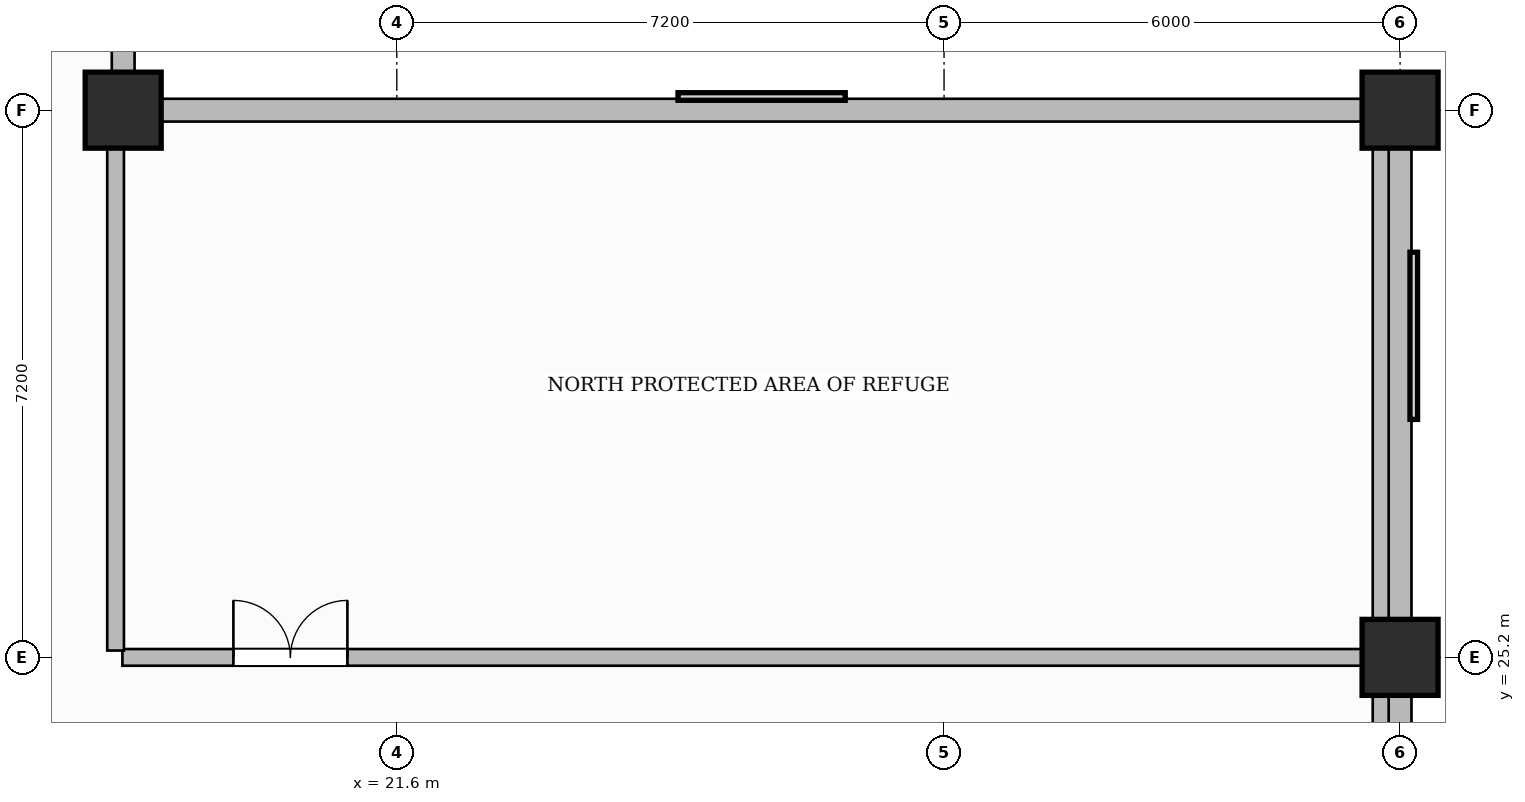
"""IFC4 building model, lengths in metres.
Left out: names, types, materials, properties, quantities, classifications, styles, units other than length and angle.
Written with IfcOpenShell. Run it as: python <this file> out.ifc"""

import sys

from ifc_helpers import new_model, si_unit, direction, frame, frame_2d, origin, origin_2d, place, context, subcontext, project, spatial, rectangle, extrude, source, transform, mapped, element, fill, save


model = new_model("IFC4")
c1 = context("Model", 3, precision=1e-05, world=origin(), true_north=direction((0.0, 1.0)))
c2 = subcontext(c1, "Body", "Model", "MODEL_VIEW")
j1 = project(units=[si_unit("LENGTHUNIT", "METRE"), si_unit("PLANEANGLEUNIT", "RADIAN")], contexts=[c1])
p1 = place(None, origin())
s1 = spatial("IfcSite", under=j1, at=p1, CompositionType="ELEMENT")
p2 = place(p1, origin())
s2 = spatial("IfcBuilding", under=s1, at=p2, CompositionType="ELEMENT")
p3 = place(p2, frame((0.0, 0.0, 196.5)))
s3 = spatial("IfcBuildingStorey", under=s2, at=p3, CompositionType="ELEMENT", Elevation=196.5)
m1 = source(origin(), c2, "Body", "SweptSolid", [
    extrude(rectangle(XDim=1.0, YDim=1.0, at=origin_2d()), origin(), (0.0, 0.0, 1.0), 5.4),
])
for number, where, z_axis, x_axis in (
    (1, (34.8, 25.2, 0.0), (0.0, 0.0, 1.0), (1.0, 0.0, 0.0)),
    (2, (34.8, 32.4, 0.0), (0.0, 0.0, 1.0), (1.0, 0.0, 0.0)),
    (3, (18.0, 32.4, 0.0), (0.0, 0.0, 1.0), (1.0, 0.0, 0.0)),
):
    element("IfcColumn", number, at=place(p3, frame(where, z_axis=z_axis, x_axis=x_axis)), inside=s3, PredefinedType="COLUMN", context=c2, shape_type="MappedRepresentation", body=[
        mapped(m1, transform((0.0, 0.0, 0.0), scale=1.0)),
    ])
p4 = place(p3, frame((17.99, 25.2, 0.0), z_axis=(0.0, 0.0, 1.0), x_axis=(1.0, 0.0, 0.0)))
e4 = element("IfcWall", 4, at=p4, inside=s3, PredefinedType="PARTITIONING", context=c2, shape_type="SweptSolid", body=[
    extrude(rectangle(XDim=16.47, YDim=0.22, at=frame_2d((8.235, 0.0))), origin(), (0.0, 0.0, 1.0), 5.15),
])
p5 = place(p4, frame((1.46, 0.0, 0.0)))
e5 = element("IfcOpeningElement", 5, at=p5, cuts=e4, PredefinedType="OPENING", context=c2, shape_type="SweptSolid", body=[
    extrude(rectangle(XDim=1.5, YDim=2.2, at=frame_2d((0.75, 1.1))), frame((0.0, 0.12, 0.0), z_axis=(0.0, -1.0, 0.0), x_axis=(1.0, 0.0, 0.0)), (0.0, 0.0, 1.0), 0.24),
])
p6 = place(p3, frame((34.55, 21.69, 0.0), z_axis=(0.0, 0.0, 1.0), x_axis=(0.0, 1.0, 0.0)))
e6 = element("IfcWall", 6, at=p6, inside=s3, PredefinedType="PARTITIONING", context=c2, shape_type="SweptSolid", body=[
    extrude(rectangle(XDim=10.47, YDim=0.22, at=frame_2d((5.235, 0.0))), origin(), (0.0, 0.0, 1.0), 4.485),
])
p7 = place(p3, frame((17.9, 25.29, 0.0), z_axis=(0.0, 0.0, 1.0), x_axis=(0.0, 1.0, 0.0)))
e7 = element("IfcWall", 7, at=p7, inside=s3, PredefinedType="PARTITIONING", context=c2, shape_type="SweptSolid", body=[
    extrude(rectangle(XDim=6.87, YDim=0.22, at=frame_2d((3.435, 0.0))), origin(), (0.0, 0.0, 1.0), 5.15),
])
p8 = place(p3, frame((18.0, 32.4, 0.0), z_axis=(0.0, 0.0, 1.0), x_axis=(0.0, 1.0, 0.0)))
e8 = element("IfcWall", 8, at=p8, inside=s3, PredefinedType="SOLIDWALL", context=c2, shape_type="SweptSolid", body=[
    extrude(rectangle(XDim=14.35, YDim=0.3, at=frame_2d((7.175, 0.0))), origin(), (0.0, 0.0, 1.0), 5.15),
])
p9 = place(p3, frame((18.0, 32.4, 0.0), z_axis=(0.0, 0.0, 1.0), x_axis=(1.0, 0.0, 0.0)))
e9 = element("IfcWall", 9, at=p9, inside=s3, PredefinedType="SOLIDWALL", context=c2, shape_type="SweptSolid", body=[
    extrude(rectangle(XDim=16.8, YDim=0.3, at=frame_2d((8.4, 0.0))), origin(), (0.0, 0.0, 1.0), 4.335),
])
p10 = place(p3, frame((34.8, 21.65, 0.0), z_axis=(0.0, 0.0, 1.0), x_axis=(0.0, 1.0, 0.0)))
e10 = element("IfcWall", 10, at=p10, inside=s3, PredefinedType="SOLIDWALL", context=c2, shape_type="SweptSolid", body=[
    extrude(rectangle(XDim=10.75, YDim=0.3, at=frame_2d((5.375, 0.0))), origin(), (0.0, 0.0, 1.0), 4.485),
])
m2 = source(origin(), c2, "Body", "SweptSolid", [
    extrude(rectangle(XDim=1.5, YDim=2.2, at=frame_2d((0.75, 1.1))), frame((0.0, 0.025, 0.0), z_axis=(0.0, -1.0, 0.0), x_axis=(1.0, 0.0, 0.0)), (0.0, 0.0, 1.0), 0.05),
])
p11 = place(p5, origin())
e11 = element("IfcDoor", 11, at=p11, inside=s3, OperationType="DOUBLE_DOOR_SINGLE_SWING", PredefinedType="DOOR", context=c2, shape_type="MappedRepresentation", body=[
    mapped(m2, transform((0.0, 0.0, 0.0), scale=1.0)),
])
fill(e5, e11)
save(model, sys.argv[1])
